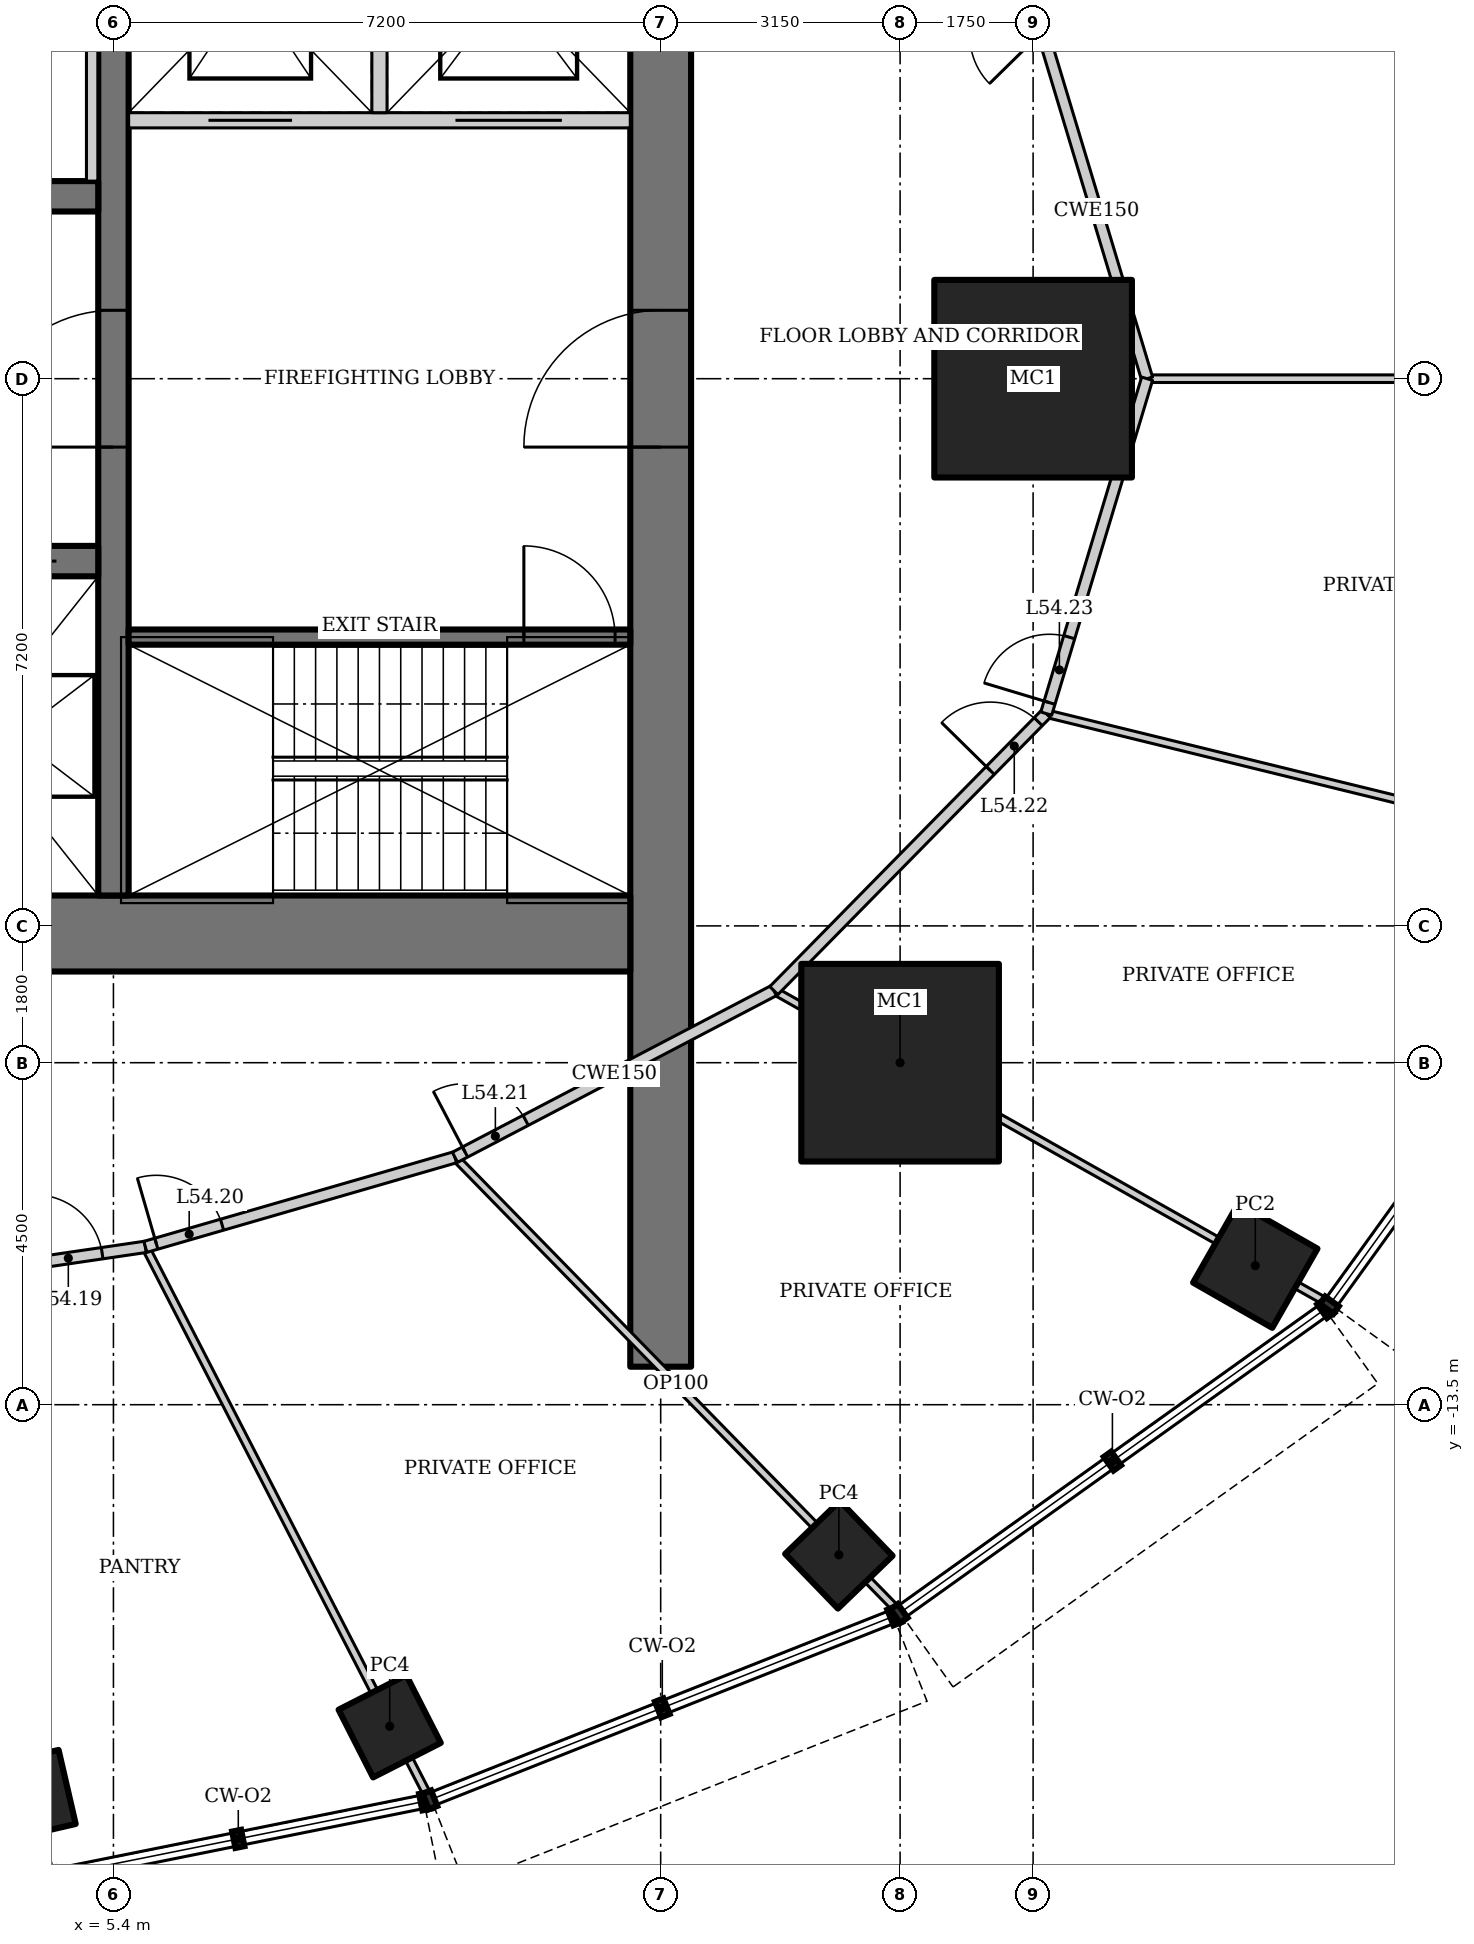
"""IFC4 building model, lengths in metres.
Left out: names, types, materials, properties, quantities, classifications, styles, units other than length and angle.
Written with IfcOpenShell. Run it as: python <this file> out.ifc"""

import sys

from ifc_helpers import new_model, si_unit, direction, frame, frame_2d, origin, origin_2d, place, context, subcontext, project, spatial, rectangle, hollow_rectangle, extrude, element, fill, save


model = new_model("IFC4")
c1 = context("Model", 3, precision=1e-05, world=origin(), true_north=direction((0.0, 1.0)))
c2 = subcontext(c1, "Body", "Model", "MODEL_VIEW")
j1 = project(units=[si_unit("LENGTHUNIT", "METRE"), si_unit("PLANEANGLEUNIT", "RADIAN")], contexts=[c1])
p1 = place(None, origin())
s1 = spatial("IfcSite", under=j1, at=p1, CompositionType="ELEMENT")
p2 = place(p1, origin())
s2 = spatial("IfcBuilding", under=s1, at=p2, CompositionType="ELEMENT")
p3 = place(p2, frame((0.0, 0.0, 232.6)))
s3 = spatial("IfcBuildingStorey", under=s2, at=p3, CompositionType="ELEMENT", Elevation=232.6)
for number, where, z_axis, x_axis in (
    (1, (17.5, 0.0, 0.0), (0.0, 0.0, 1.0), (1.0, 0.0, 0.0)),
    (2, (15.75, -9.0, 0.0), (0.0, 0.0, 1.0), (1.0, 0.0, 0.0)),
):
    element("IfcColumn", number, at=place(p3, frame(where, z_axis=z_axis, x_axis=x_axis)), inside=s3, PredefinedType="COLUMN", context=c2, shape_type="SweptSolid", body=[
        extrude(hollow_rectangle(XDim=2.6, YDim=2.6, WallThickness=0.13, at=origin_2d()), origin(), (0.0, 0.0, 1.0), 4.2),
    ])
for number, where, z_axis, x_axis in (
    (3, (4.304, -18.642, 0.0), (0.0, 0.0, 1.0), (0.974, 0.225, 0.0)),
    (4, (9.035, -17.731, 0.0), (0.0, 0.0, 1.0), (0.891, 0.454, 0.0)),
    (5, (14.944, -15.475, 0.0), (0.0, 0.0, 1.0), (0.719, 0.695, 0.0)),
):
    element("IfcColumn", number, at=place(p3, frame(where, z_axis=z_axis, x_axis=x_axis)), inside=s3, PredefinedType="COLUMN", context=c2, shape_type="SweptSolid", body=[
        extrude(hollow_rectangle(XDim=1.0, YDim=1.0, WallThickness=0.08, at=origin_2d()), origin(), (0.0, 0.0, 1.0), 4.2),
    ])
p4 = place(p3, frame((20.423, -11.67, 0.0), z_axis=(0.0, 0.0, 1.0), x_axis=(0.496139221777, 0.86824298017, 0.0)))
e6 = element("IfcColumn", 6, at=p4, inside=s3, PredefinedType="COLUMN", context=c2, shape_type="SweptSolid", body=[
    extrude(hollow_rectangle(XDim=1.2, YDim=1.2, WallThickness=0.1, at=origin_2d()), origin(), (0.0, 0.0, 1.0), 4.2),
])
p5 = place(p3, frame((12.6, -13.0, 0.0), z_axis=(0.0, 0.0, 1.0), x_axis=(0.0, 1.0, 0.0)))
e7 = element("IfcWall", 7, at=p5, inside=s3, PredefinedType="SHEAR", context=c2, shape_type="SweptSolid", body=[
    extrude(rectangle(XDim=26.0, YDim=0.8, at=frame_2d((13.0, 0.0))), origin(), (0.0, 0.0, 1.0), 4.2),
])
p6 = place(p5, frame((12.1, 0.0, 0.0)))
e8 = element("IfcOpeningElement", 8, at=p6, cuts=e7, PredefinedType="OPENING", context=c2, shape_type="SweptSolid", body=[
    extrude(rectangle(XDim=1.8, YDim=2.1, at=frame_2d((0.9, 1.05))), frame((0.0, 0.41, 0.0), z_axis=(0.0, -1.0, 0.0), x_axis=(1.0, 0.0, 0.0)), (0.0, 0.0, 1.0), 0.82),
])
p7 = place(p3, frame((-12.2, -7.3, 0.0), z_axis=(0.0, 0.0, 1.0), x_axis=(1.0, 0.0, 0.0)))
e9 = element("IfcWall", 9, at=p7, inside=s3, PredefinedType="SHEAR", context=c2, shape_type="SweptSolid", body=[
    extrude(rectangle(XDim=24.4, YDim=1.0, at=frame_2d((12.2, 0.0))), origin(), (0.0, 0.0, 1.0), 4.2),
])
p8 = place(p3, frame((5.4, -6.8, 0.0), z_axis=(0.0, 0.0, 1.0), x_axis=(0.0, 1.0, 0.0)))
e10 = element("IfcWall", 10, at=p8, inside=s3, PredefinedType="SHEAR", context=c2, shape_type="SweptSolid", body=[
    extrude(rectangle(XDim=14.6, YDim=0.4, at=frame_2d((7.3, 0.0))), origin(), (0.0, 0.0, 1.0), 4.2),
])
p9 = place(p8, frame((5.9, 0.0, 0.0)))
e11 = element("IfcOpeningElement", 11, at=p9, cuts=e10, PredefinedType="OPENING", context=c2, shape_type="SweptSolid", body=[
    extrude(rectangle(XDim=1.8, YDim=2.1, at=frame_2d((0.9, 1.05))), frame((0.0, 0.21, 0.0), z_axis=(0.0, -1.0, 0.0), x_axis=(1.0, 0.0, 0.0)), (0.0, 0.0, 1.0), 0.42),
])
p10 = place(p3, frame((-5.2, -2.4, 0.0), z_axis=(0.0, 0.0, 1.0), x_axis=(1.0, 0.0, 0.0)))
e12 = element("IfcWall", 12, at=p10, inside=s3, PredefinedType="SHEAR", context=c2, shape_type="SweptSolid", body=[
    extrude(rectangle(XDim=10.4, YDim=0.4, at=frame_2d((5.2, 0.0))), origin(), (0.0, 0.0, 1.0), 4.2),
])
p11 = place(p10, frame((1.683, 0.0, 0.0)))
e13 = element("IfcOpeningElement", 13, at=p11, cuts=e12, PredefinedType="OPENING", context=c2, shape_type="SweptSolid", body=[
    extrude(rectangle(XDim=1.1, YDim=2.2, at=frame_2d((0.55, 1.1))), frame((0.0, 0.21, 0.0), z_axis=(0.0, -1.0, 0.0), x_axis=(1.0, 0.0, 0.0)), (0.0, 0.0, 1.0), 0.42),
])
p12 = place(p10, frame((5.217, 0.0, 0.0)))
e14 = element("IfcOpeningElement", 14, at=p12, cuts=e12, PredefinedType="OPENING", context=c2, shape_type="SweptSolid", body=[
    extrude(rectangle(XDim=1.1, YDim=2.2, at=frame_2d((0.55, 1.1))), frame((0.0, 0.21, 0.0), z_axis=(0.0, -1.0, 0.0), x_axis=(1.0, 0.0, 0.0)), (0.0, 0.0, 1.0), 0.42),
])
p13 = place(p10, frame((8.75, 0.0, 0.0)))
e15 = element("IfcOpeningElement", 15, at=p13, cuts=e12, PredefinedType="OPENING", context=c2, shape_type="SweptSolid", body=[
    extrude(rectangle(XDim=1.1, YDim=2.2, at=frame_2d((0.55, 1.1))), frame((0.0, 0.21, 0.0), z_axis=(0.0, -1.0, 0.0), x_axis=(1.0, 0.0, 0.0)), (0.0, 0.0, 1.0), 0.42),
])
p14 = place(p3, frame((5.2, 2.4, 0.0), z_axis=(0.0, 0.0, 1.0), x_axis=(-1.0, 0.0, 0.0)))
e16 = element("IfcWall", 16, at=p14, inside=s3, PredefinedType="SHEAR", context=c2, shape_type="SweptSolid", body=[
    extrude(rectangle(XDim=10.4, YDim=0.4, at=frame_2d((5.2, 0.0))), origin(), (0.0, 0.0, 1.0), 4.2),
])
p15 = place(p3, frame((5.6, -3.4, 0.0), z_axis=(0.0, 0.0, 1.0), x_axis=(1.0, 0.0, 0.0)))
e17 = element("IfcWall", 17, at=p15, inside=s3, PredefinedType="SHEAR", context=c2, shape_type="SweptSolid", body=[
    extrude(rectangle(XDim=6.6, YDim=0.2, at=frame_2d((3.3, 0.0))), origin(), (0.0, 0.0, 1.0), 4.2),
])
p16 = place(p15, frame((5.2, 0.0, 0.0)))
e18 = element("IfcOpeningElement", 18, at=p16, cuts=e17, PredefinedType="OPENING", context=c2, shape_type="SweptSolid", body=[
    extrude(rectangle(XDim=1.2, YDim=2.1, at=frame_2d((0.6, 1.05))), frame((0.0, 0.11, 0.0), z_axis=(0.0, -1.0, 0.0), x_axis=(1.0, 0.0, 0.0)), (0.0, 0.0, 1.0), 0.22),
])
p17 = place(p3, frame((12.2, 3.4, 0.0), z_axis=(0.0, 0.0, 1.0), x_axis=(-1.0, 0.0, 0.0)))
e19 = element("IfcWall", 19, at=p17, inside=s3, PredefinedType="SOLIDWALL", context=c2, shape_type="SweptSolid", body=[
    extrude(rectangle(XDim=6.6, YDim=0.2, at=frame_2d((3.3, 0.0))), origin(), (0.0, 0.0, 1.0), 4.2),
])
p18 = place(p17, frame((4.45, 0.0, 0.0)))
e20 = element("IfcOpeningElement", 20, at=p18, cuts=e19, PredefinedType="OPENING", context=c2, shape_type="SweptSolid", body=[
    extrude(rectangle(XDim=1.1, YDim=2.2, at=frame_2d((0.55, 1.1))), frame((0.0, 0.11, 0.0), z_axis=(0.0, -1.0, 0.0), x_axis=(1.0, 0.0, 0.0)), (0.0, 0.0, 1.0), 0.22),
])
p19 = place(p17, frame((0.9, 0.0, 0.0)))
e21 = element("IfcOpeningElement", 21, at=p19, cuts=e19, PredefinedType="OPENING", context=c2, shape_type="SweptSolid", body=[
    extrude(rectangle(XDim=1.4, YDim=2.2, at=frame_2d((0.7, 1.1))), frame((0.0, 0.11, 0.0), z_axis=(0.0, -1.0, 0.0), x_axis=(1.0, 0.0, 0.0)), (0.0, 0.0, 1.0), 0.22),
])
p20 = place(p3, frame((8.9, 3.5, 0.0), z_axis=(0.0, 0.0, 1.0), x_axis=(0.0, 1.0, 0.0)))
e22 = element("IfcWall", 22, at=p20, inside=s3, PredefinedType="SOLIDWALL", context=c2, shape_type="SweptSolid", body=[
    extrude(rectangle(XDim=3.3, YDim=0.2, at=frame_2d((1.65, 0.0))), origin(), (0.0, 0.0, 1.0), 4.2),
])
p21 = place(p3, frame((26.944, 0.0, 0.0), z_axis=(0.0, 0.0, 1.0), x_axis=(-1.0, 0.0, 0.0)))
e23 = element("IfcWall", 23, at=p21, inside=s3, PredefinedType="PARTITIONING", context=c2, shape_type="SweptSolid", body=[
    extrude(rectangle(XDim=7.944, YDim=0.1, at=frame_2d((3.972, 0.0))), origin(), (0.0, 0.0, 1.0), 3.349),
])
p22 = place(p3, frame((4.556, -19.657, 0.0), z_axis=(0.0, 0.0, 1.0), x_axis=(-0.227034513848, 0.973886712879, 0.0)))
e24 = element("IfcWall", 24, at=p22, inside=s3, PredefinedType="PARTITIONING", context=c2, shape_type="SweptSolid", body=[
    extrude(rectangle(XDim=7.991, YDim=0.1, at=frame_2d((3.996, 0.0))), origin(), (0.0, 0.0, 1.0), 3.293),
])
p23 = place(p3, frame((9.539, -18.65, 0.0), z_axis=(0.0, 0.0, 1.0), x_axis=(-0.457552286462, 0.88918271753, 0.0)))
e25 = element("IfcWall", 25, at=p23, inside=s3, PredefinedType="PARTITIONING", context=c2, shape_type="SweptSolid", body=[
    extrude(rectangle(XDim=8.128, YDim=0.1, at=frame_2d((4.064, 0.0))), origin(), (0.0, 0.0, 1.0), 3.293),
])
p24 = place(p3, frame((15.709, -16.199, 0.0), z_axis=(0.0, 0.0, 1.0), x_axis=(-0.69875697861, 0.715359129978, 0.0)))
e26 = element("IfcWall", 26, at=p24, inside=s3, PredefinedType="PARTITIONING", context=c2, shape_type="SweptSolid", body=[
    extrude(rectangle(XDim=8.323, YDim=0.1, at=frame_2d((4.162, 0.0))), origin(), (0.0, 0.0, 1.0), 3.41),
])
p25 = place(p3, frame((21.358, -12.15, 0.0), z_axis=(0.0, 0.0, 1.0), x_axis=(-0.871080529249, 0.491140215786, 0.0)))
e27 = element("IfcWall", 27, at=p25, inside=s3, PredefinedType="PARTITIONING", context=c2, shape_type="SweptSolid", body=[
    extrude(rectangle(XDim=8.345, YDim=0.1, at=frame_2d((4.173, 0.0))), origin(), (0.0, 0.0, 1.0), 3.521),
])
p26 = place(p3, frame((25.543, -6.336, 0.0), z_axis=(0.0, 0.0, 1.0), x_axis=(-0.97123661777, 0.238116425942, 0.0)))
e28 = element("IfcWall", 28, at=p26, inside=s3, PredefinedType="PARTITIONING", context=c2, shape_type="SweptSolid", body=[
    extrude(rectangle(XDim=8.103, YDim=0.1, at=frame_2d((4.052, 0.0))), origin(), (0.0, 0.0, 1.0), 3.108),
])
p27 = place(p3, frame((19.0, 0.0, 0.0), z_axis=(0.0, 0.0, 1.0), x_axis=(-0.288399048695, 0.957510307366, 0.0)))
e29 = element("IfcWall", 29, at=p27, inside=s3, PredefinedType="PARTITIONING", context=c2, shape_type="SweptSolid", body=[
    extrude(rectangle(XDim=4.602, YDim=0.15, at=frame_2d((2.301, 0.0))), origin(), (0.0, 0.0, 1.0), 4.05),
])
p28 = place(p3, frame((2.741, -11.875, 0.0), z_axis=(0.0, 0.0, 1.0), x_axis=(0.989421822189, 0.145067080265, 0.0)))
e30 = element("IfcWall", 30, at=p28, inside=s3, PredefinedType="PARTITIONING", context=c2, shape_type="SweptSolid", body=[
    extrude(rectangle(XDim=3.112, YDim=0.15, at=frame_2d((1.556, 0.0))), origin(), (0.0, 0.0, 1.0), 4.05),
])
p29 = place(p28, frame((1.637, 0.0, 0.0)))
e31 = element("IfcOpeningElement", 31, at=p29, cuts=e30, PredefinedType="OPENING", context=c2, shape_type="SweptSolid", body=[
    extrude(rectangle(XDim=0.9, YDim=2.1, at=frame_2d((0.45, 1.05))), frame((0.0, 0.085, 0.0), z_axis=(0.0, -1.0, 0.0), x_axis=(1.0, 0.0, 0.0)), (0.0, 0.0, 1.0), 0.17),
])
p30 = place(p3, frame((5.82, -11.423, 0.0), z_axis=(0.0, 0.0, 1.0), x_axis=(0.960614838378, 0.27788330696, 0.0)))
e32 = element("IfcWall", 32, at=p30, inside=s3, PredefinedType="PARTITIONING", context=c2, shape_type="SweptSolid", body=[
    extrude(rectangle(XDim=4.24, YDim=0.15, at=frame_2d((2.12, 0.0))), origin(), (0.0, 0.0, 1.0), 4.05),
])
p31 = place(p30, frame((0.15, 0.0, 0.0)))
e33 = element("IfcOpeningElement", 33, at=p31, cuts=e32, PredefinedType="OPENING", context=c2, shape_type="SweptSolid", body=[
    extrude(rectangle(XDim=0.9, YDim=2.1, at=frame_2d((0.45, 1.05))), frame((0.0, 0.085, 0.0), z_axis=(0.0, -1.0, 0.0), x_axis=(1.0, 0.0, 0.0)), (0.0, 0.0, 1.0), 0.17),
])
p32 = place(p3, frame((9.893, -10.245, 0.0), z_axis=(0.0, 0.0, 1.0), x_axis=(0.886174439647, 0.463351769735, 0.0)))
e34 = element("IfcWall", 34, at=p32, inside=s3, PredefinedType="PARTITIONING", context=c2, shape_type="SweptSolid", body=[
    extrude(rectangle(XDim=4.735, YDim=0.15, at=frame_2d((2.367, 0.0))), origin(), (0.0, 0.0, 1.0), 4.05),
])
p33 = place(p32, frame((0.15, 0.0, 0.0)))
e35 = element("IfcOpeningElement", 35, at=p33, cuts=e34, PredefinedType="OPENING", context=c2, shape_type="SweptSolid", body=[
    extrude(rectangle(XDim=0.9, YDim=2.1, at=frame_2d((0.45, 1.05))), frame((0.0, 0.085, 0.0), z_axis=(0.0, -1.0, 0.0), x_axis=(1.0, 0.0, 0.0)), (0.0, 0.0, 1.0), 0.17),
])
p34 = place(p3, frame((14.089, -8.051, 0.0), z_axis=(0.0, 0.0, 1.0), x_axis=(0.701111216625, 0.713051934941, 0.0)))
e36 = element("IfcWall", 36, at=p34, inside=s3, PredefinedType="PARTITIONING", context=c2, shape_type="SweptSolid", body=[
    extrude(rectangle(XDim=5.112, YDim=0.15, at=frame_2d((2.556, 0.0))), origin(), (0.0, 0.0, 1.0), 4.05),
])
p35 = place(p34, frame((4.061, 0.0, 0.0)))
e37 = element("IfcOpeningElement", 37, at=p35, cuts=e36, PredefinedType="OPENING", context=c2, shape_type="SweptSolid", body=[
    extrude(rectangle(XDim=0.9, YDim=2.1, at=frame_2d((0.45, 1.05))), frame((0.0, 0.085, 0.0), z_axis=(0.0, -1.0, 0.0), x_axis=(1.0, 0.0, 0.0)), (0.0, 0.0, 1.0), 0.17),
])
p36 = place(p3, frame((17.673, -4.406, 0.0), z_axis=(0.0, 0.0, 1.0), x_axis=(0.288399048695, 0.957510307366, 0.0)))
e38 = element("IfcWall", 38, at=p36, inside=s3, PredefinedType="PARTITIONING", context=c2, shape_type="SweptSolid", body=[
    extrude(rectangle(XDim=4.602, YDim=0.15, at=frame_2d((2.301, 0.0))), origin(), (0.0, 0.0, 1.0), 4.05),
])
p37 = place(p36, frame((0.15, 0.0, 0.0)))
e39 = element("IfcOpeningElement", 39, at=p37, cuts=e38, PredefinedType="OPENING", context=c2, shape_type="SweptSolid", body=[
    extrude(rectangle(XDim=0.9, YDim=2.1, at=frame_2d((0.45, 1.05))), frame((0.0, 0.085, 0.0), z_axis=(0.0, -1.0, 0.0), x_axis=(1.0, 0.0, 0.0)), (0.0, 0.0, 1.0), 0.17),
])
p38 = place(p3, frame((5.12, 2.6, 0.0), z_axis=(0.0, 0.0, 1.0), x_axis=(0.0, 1.0, 0.0)))
e40 = element("IfcWall", 40, at=p38, inside=s3, PredefinedType="SOLIDWALL", context=c2, shape_type="SweptSolid", body=[
    extrude(rectangle(XDim=4.4, YDim=0.15, at=frame_2d((2.2, 0.0))), origin(), (0.0, 0.0, 1.0), 4.05),
])
p39 = place(p9, origin())
e41 = element("IfcDoor", 41, at=p39, inside=s3, OperationType="DOUBLE_DOOR_DOUBLE_SWING", PredefinedType="DOOR", context=c2, shape_type="SweptSolid", body=[
    extrude(rectangle(XDim=1.8, YDim=2.1, at=frame_2d((0.9, 1.05))), frame((0.0, 0.025, 0.0), z_axis=(0.0, -1.0, 0.0), x_axis=(1.0, 0.0, 0.0)), (0.0, 0.0, 1.0), 0.05),
])
fill(e11, e41)
p40 = place(p16, origin())
e42 = element("IfcDoor", 42, at=p40, inside=s3, OperationType="SINGLE_SWING_RIGHT", PredefinedType="DOOR", context=c2, shape_type="SweptSolid", body=[
    extrude(rectangle(XDim=1.2, YDim=2.1, at=frame_2d((0.6, 1.05))), frame((0.0, 0.025, 0.0), z_axis=(0.0, -1.0, 0.0), x_axis=(1.0, 0.0, 0.0)), (0.0, 0.0, 1.0), 0.05),
])
fill(e18, e42)
p41 = place(p6, origin())
e43 = element("IfcDoor", 43, at=p41, inside=s3, OperationType="DOUBLE_DOOR_DOUBLE_SWING", PredefinedType="DOOR", context=c2, shape_type="SweptSolid", body=[
    extrude(rectangle(XDim=1.8, YDim=2.1, at=frame_2d((0.9, 1.05))), frame((0.0, 0.025, 0.0), z_axis=(0.0, -1.0, 0.0), x_axis=(1.0, 0.0, 0.0)), (0.0, 0.0, 1.0), 0.05),
])
fill(e8, e43)
p42 = place(p13, origin())
e44 = element("IfcDoor", 44, at=p42, inside=s3, OperationType="DOUBLE_DOOR_SLIDING", PredefinedType="DOOR", context=c2, shape_type="SweptSolid", body=[
    extrude(rectangle(XDim=1.1, YDim=2.2, at=frame_2d((0.55, 1.1))), frame((0.0, 0.025, 0.0), z_axis=(0.0, -1.0, 0.0), x_axis=(1.0, 0.0, 0.0)), (0.0, 0.0, 1.0), 0.05),
])
fill(e15, e44)
p43 = place(p18, origin())
e45 = element("IfcDoor", 45, at=p43, inside=s3, OperationType="DOUBLE_DOOR_SLIDING", PredefinedType="DOOR", context=c2, shape_type="SweptSolid", body=[
    extrude(rectangle(XDim=1.1, YDim=2.2, at=frame_2d((0.55, 1.1))), frame((0.0, 0.025, 0.0), z_axis=(0.0, -1.0, 0.0), x_axis=(1.0, 0.0, 0.0)), (0.0, 0.0, 1.0), 0.05),
])
fill(e20, e45)
p44 = place(p19, origin())
e46 = element("IfcDoor", 46, at=p44, inside=s3, OperationType="DOUBLE_DOOR_SLIDING", PredefinedType="DOOR", context=c2, shape_type="SweptSolid", body=[
    extrude(rectangle(XDim=1.4, YDim=2.2, at=frame_2d((0.7, 1.1))), frame((0.0, 0.025, 0.0), z_axis=(0.0, -1.0, 0.0), x_axis=(1.0, 0.0, 0.0)), (0.0, 0.0, 1.0), 0.05),
])
fill(e21, e46)
p45 = place(p29, origin())
e47 = element("IfcDoor", 47, at=p45, inside=s3, OperationType="SINGLE_SWING_LEFT", PredefinedType="DOOR", context=c2, shape_type="SweptSolid", body=[
    extrude(rectangle(XDim=0.9, YDim=2.1, at=frame_2d((0.45, 1.05))), frame((0.0, 0.025, 0.0), z_axis=(0.0, -1.0, 0.0), x_axis=(1.0, 0.0, 0.0)), (0.0, 0.0, 1.0), 0.05),
])
fill(e31, e47)
p46 = place(p31, origin())
e48 = element("IfcDoor", 48, at=p46, inside=s3, OperationType="SINGLE_SWING_LEFT", PredefinedType="DOOR", context=c2, shape_type="SweptSolid", body=[
    extrude(rectangle(XDim=0.9, YDim=2.1, at=frame_2d((0.45, 1.05))), frame((0.0, 0.025, 0.0), z_axis=(0.0, -1.0, 0.0), x_axis=(1.0, 0.0, 0.0)), (0.0, 0.0, 1.0), 0.05),
])
fill(e33, e48)
p47 = place(p33, origin())
e49 = element("IfcDoor", 49, at=p47, inside=s3, OperationType="SINGLE_SWING_LEFT", PredefinedType="DOOR", context=c2, shape_type="SweptSolid", body=[
    extrude(rectangle(XDim=0.9, YDim=2.1, at=frame_2d((0.45, 1.05))), frame((0.0, 0.025, 0.0), z_axis=(0.0, -1.0, 0.0), x_axis=(1.0, 0.0, 0.0)), (0.0, 0.0, 1.0), 0.05),
])
fill(e35, e49)
p48 = place(p35, origin())
e50 = element("IfcDoor", 50, at=p48, inside=s3, OperationType="SINGLE_SWING_LEFT", PredefinedType="DOOR", context=c2, shape_type="SweptSolid", body=[
    extrude(rectangle(XDim=0.9, YDim=2.1, at=frame_2d((0.45, 1.05))), frame((0.0, 0.025, 0.0), z_axis=(0.0, -1.0, 0.0), x_axis=(1.0, 0.0, 0.0)), (0.0, 0.0, 1.0), 0.05),
])
fill(e37, e50)
p49 = place(p37, origin())
e51 = element("IfcDoor", 51, at=p49, inside=s3, OperationType="SINGLE_SWING_LEFT", PredefinedType="DOOR", context=c2, shape_type="SweptSolid", body=[
    extrude(rectangle(XDim=0.9, YDim=2.1, at=frame_2d((0.45, 1.05))), frame((0.0, 0.025, 0.0), z_axis=(0.0, -1.0, 0.0), x_axis=(1.0, 0.0, 0.0)), (0.0, 0.0, 1.0), 0.05),
])
fill(e39, e51)
save(model, sys.argv[1])
